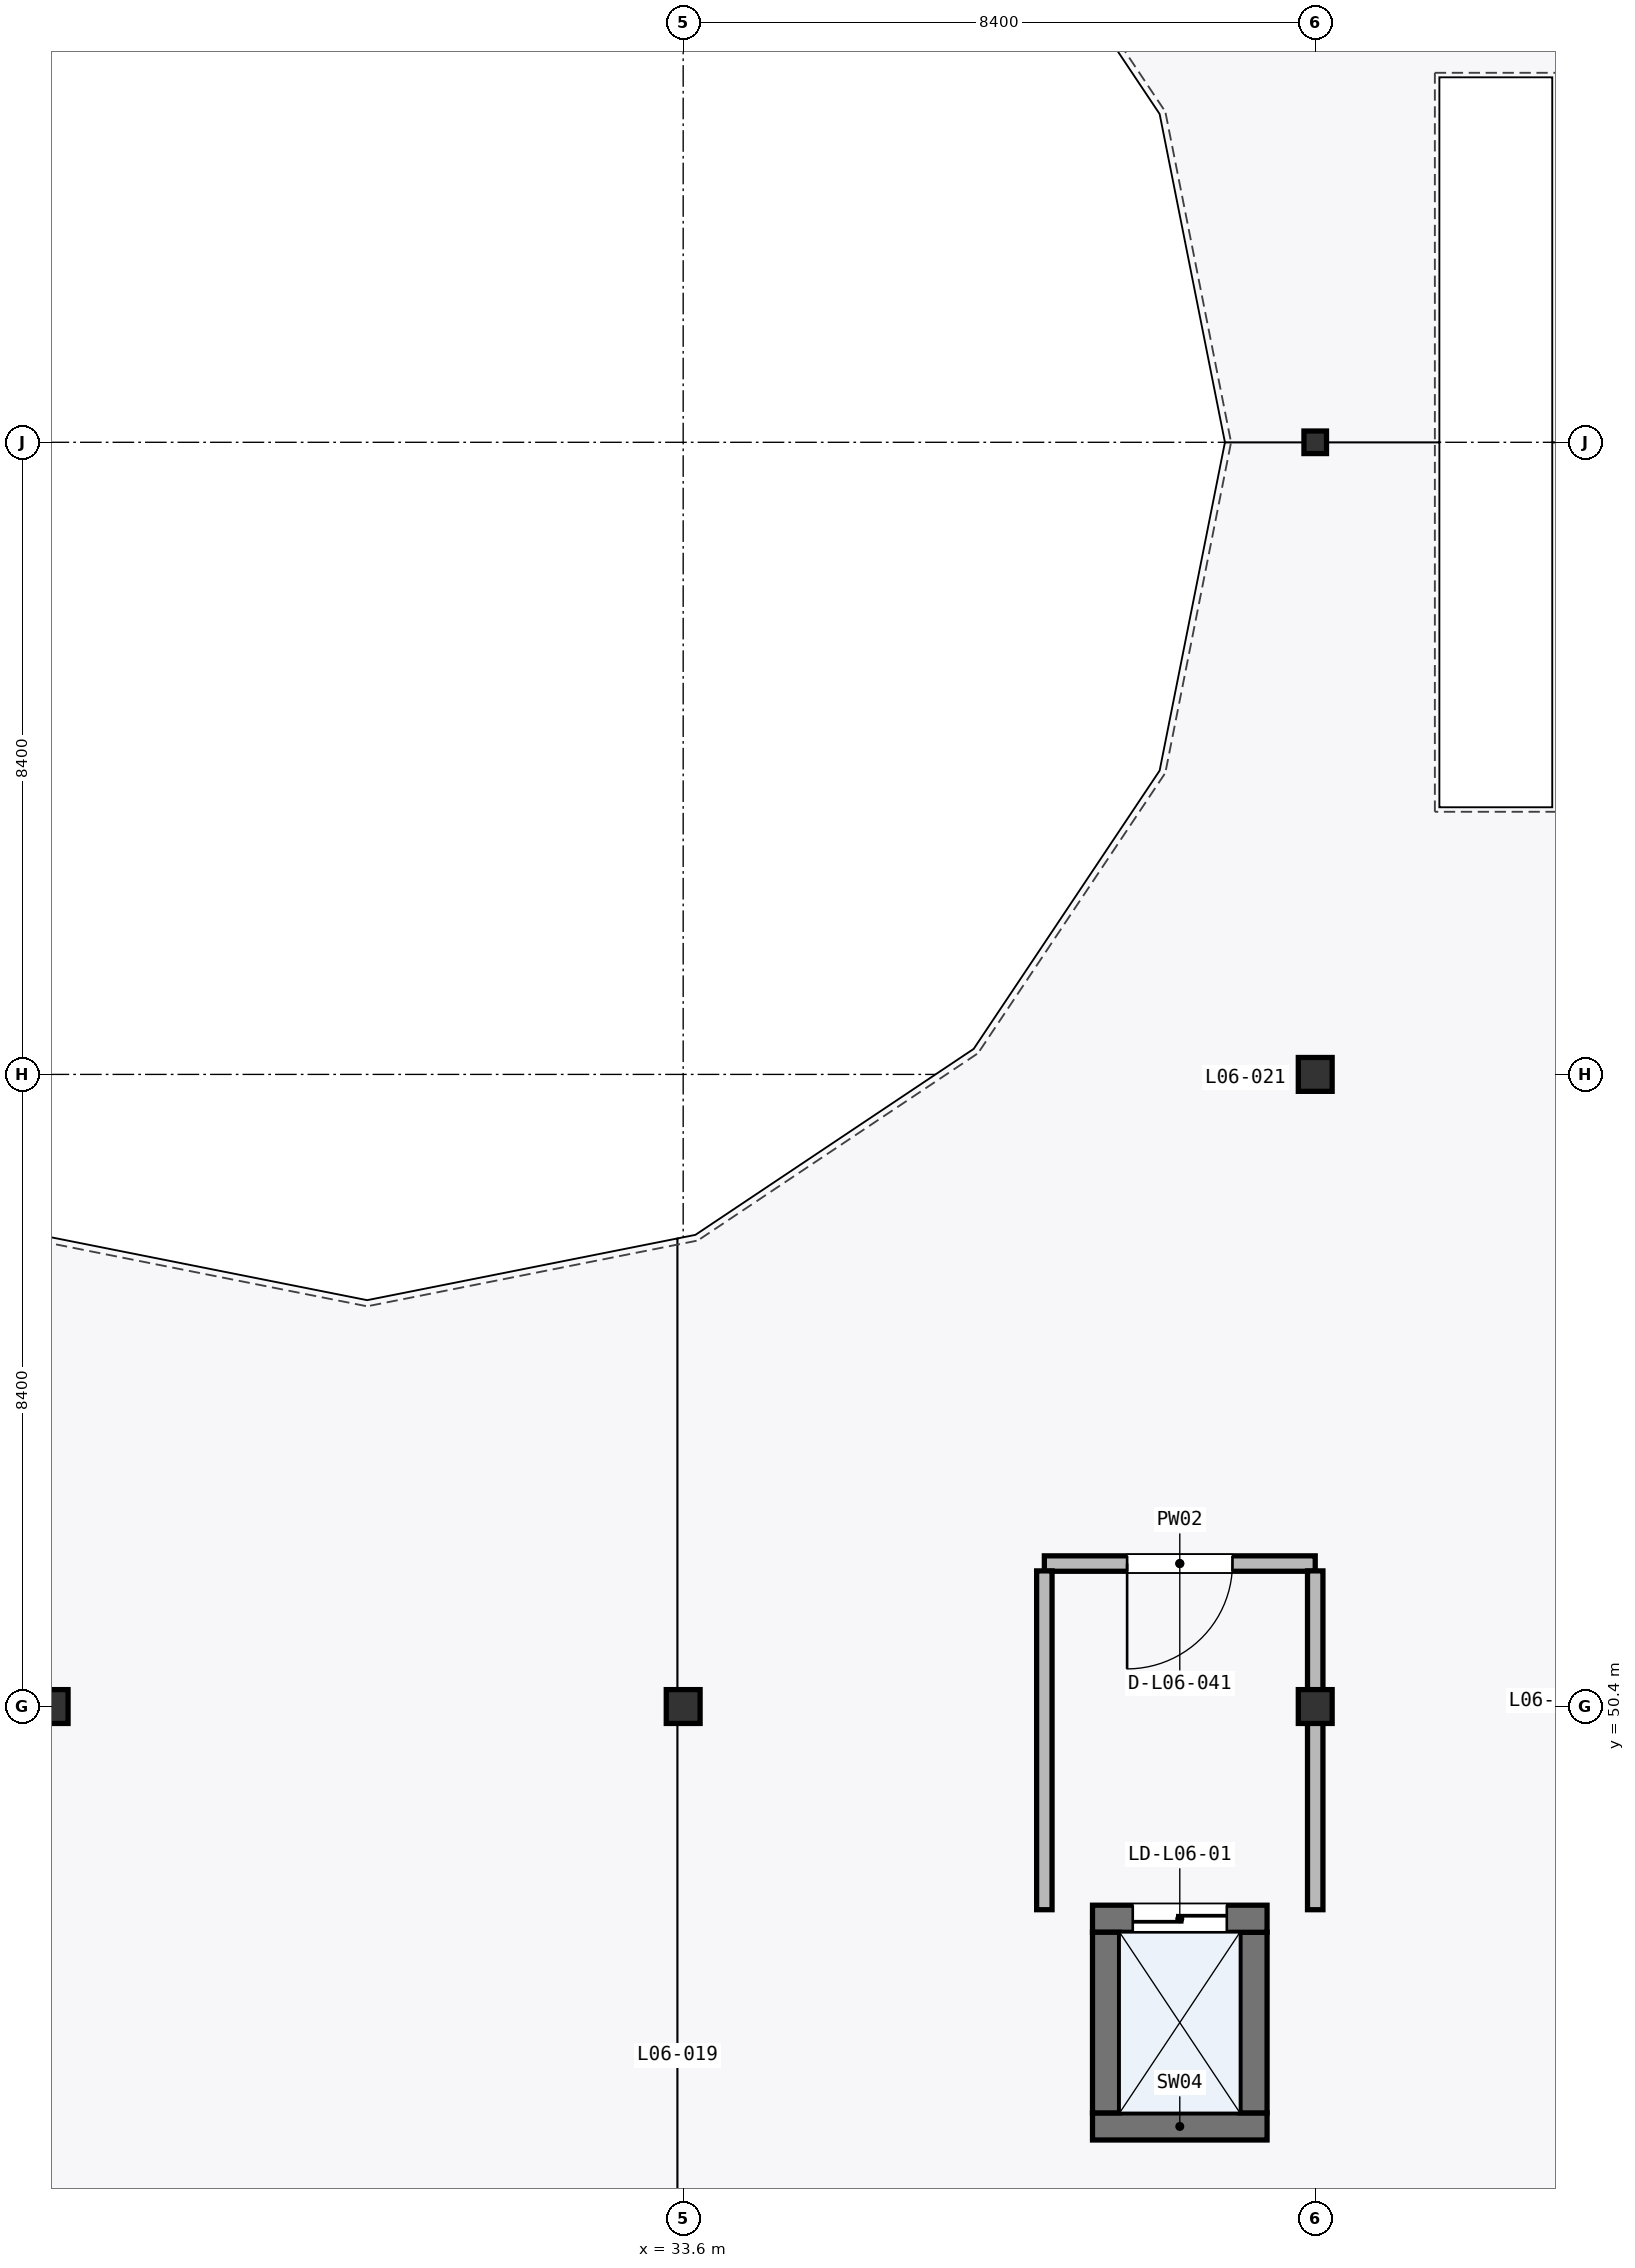
"""IFC4 building model, lengths in metres.
Left out: names, types, materials, properties, quantities, classifications, styles, units other than length and angle.
Written with IfcOpenShell. Run it as: python <this file> out.ifc"""

import sys

from ifc_helpers import new_model, si_unit, direction, frame, frame_2d, origin, origin_2d, place, context, subcontext, project, spatial, rectangle, hollow_rectangle, i_section, extrude, element, fill, save


model = new_model("IFC4")
c1 = context("Model", 3, precision=1e-05, world=origin(), true_north=direction((0.0, 1.0)))
c2 = subcontext(c1, "Body", "Model", "MODEL_VIEW")
j1 = project(units=[si_unit("LENGTHUNIT", "METRE"), si_unit("PLANEANGLEUNIT", "RADIAN")], contexts=[c1])
p1 = place(None, origin())
s1 = spatial("IfcSite", under=j1, at=p1, CompositionType="ELEMENT")
p2 = place(p1, origin())
s2 = spatial("IfcBuilding", under=s1, at=p2, CompositionType="ELEMENT")
p3 = place(p2, frame((0.0, 0.0, 26.7)))
s3 = spatial("IfcBuildingStorey", under=s2, at=p3, CompositionType="ELEMENT", Elevation=26.7)
for number, where, z_axis, x_axis in (
    (1, (25.2, 50.4, 0.0), (0.0, 0.0, 1.0), (1.0, 0.0, 0.0)),
    (2, (33.6, 50.4, 0.0), (0.0, 0.0, 1.0), (1.0, 0.0, 0.0)),
    (3, (42.0, 50.4, 0.0), (0.0, 0.0, 1.0), (1.0, 0.0, 0.0)),
    (4, (42.0, 58.8, 0.0), (0.0, 0.0, 1.0), (1.0, 0.0, 0.0)),
):
    element("IfcColumn", number, at=place(p3, frame(where, z_axis=z_axis, x_axis=x_axis)), inside=s3, PredefinedType="COLUMN", context=c2, shape_type="SweptSolid", body=[
        extrude(hollow_rectangle(XDim=0.45, YDim=0.45, WallThickness=0.018, at=origin_2d()), origin(), (0.0, 0.0, 1.0), 5.1),
    ])
p4 = place(p3, frame((42.0, 67.2, 0.0), z_axis=(0.0, 0.0, 1.0), x_axis=(1.0, 0.0, 0.0)))
e5 = element("IfcColumn", 5, at=p4, inside=s3, PredefinedType="COLUMN", context=c2, shape_type="SweptSolid", body=[
    extrude(i_section(OverallWidth=0.3, OverallDepth=0.3, WebThickness=0.01, FlangeThickness=0.015, FilletRadius=0.018, at=origin_2d()), origin(), (0.0, 0.0, 1.0), 5.1),
])
p5 = place(p3, frame((39.04, 44.82, 0.0), z_axis=(0.0, 0.0, 1.0), x_axis=(1.0, 0.0, 0.0)))
e6 = element("IfcWall", 6, at=p5, inside=s3, PredefinedType="SHEAR", context=c2, shape_type="SweptSolid", body=[
    extrude(rectangle(XDim=2.32, YDim=0.36, at=frame_2d((1.16, 0.0))), origin(), (0.0, 0.0, 1.0), 4.095),
])
p6 = place(p3, frame((41.18, 45.0, 0.0), z_axis=(0.0, 0.0, 1.0), x_axis=(0.0, 1.0, 0.0)))
e7 = element("IfcWall", 7, at=p6, inside=s3, PredefinedType="SHEAR", context=c2, shape_type="SweptSolid", body=[
    extrude(rectangle(XDim=2.4, YDim=0.36, at=frame_2d((1.2, 0.0))), origin(), (0.0, 0.0, 1.0), 4.095),
])
p7 = place(p3, frame((41.36, 47.58, 0.0), z_axis=(0.0, 0.0, 1.0), x_axis=(-1.0, 0.0, 0.0)))
e8 = element("IfcWall", 8, at=p7, inside=s3, PredefinedType="SHEAR", context=c2, shape_type="SweptSolid", body=[
    extrude(rectangle(XDim=2.32, YDim=0.36, at=frame_2d((1.16, 0.0))), origin(), (0.0, 0.0, 1.0), 4.095),
])
p8 = place(p7, frame((0.535, 0.0, 0.0)))
e9 = element("IfcOpeningElement", 9, at=p8, cuts=e8, PredefinedType="OPENING", context=c2, shape_type="SweptSolid", body=[
    extrude(rectangle(XDim=1.25, YDim=2.2, at=frame_2d((0.625, 1.1))), frame((0.0, 0.19, 0.0), z_axis=(0.0, -1.0, 0.0), x_axis=(1.0, 0.0, 0.0)), (0.0, 0.0, 1.0), 0.38),
])
p9 = place(p3, frame((39.22, 47.4, 0.0), z_axis=(0.0, 0.0, 1.0), x_axis=(0.0, -1.0, 0.0)))
e10 = element("IfcWall", 10, at=p9, inside=s3, PredefinedType="SHEAR", context=c2, shape_type="SweptSolid", body=[
    extrude(rectangle(XDim=2.4, YDim=0.36, at=frame_2d((1.2, 0.0))), origin(), (0.0, 0.0, 1.0), 4.095),
])
p10 = place(p3, frame((42.0, 52.3, 0.0), z_axis=(0.0, 0.0, 1.0), x_axis=(-1.0, 0.0, 0.0)))
e11 = element("IfcWall", 11, at=p10, inside=s3, PredefinedType="PARTITIONING", context=c2, shape_type="SweptSolid", body=[
    extrude(rectangle(XDim=3.6, YDim=0.205, at=frame_2d((1.8, 0.0))), origin(), (0.0, 0.0, 1.0), 4.845),
])
p11 = place(p10, frame((1.1, 0.0, 0.0)))
e12 = element("IfcOpeningElement", 12, at=p11, cuts=e11, PredefinedType="OPENING", context=c2, shape_type="SweptSolid", body=[
    extrude(rectangle(XDim=1.4, YDim=2.15, at=frame_2d((0.7, 1.075))), frame((0.0, 0.113, 0.0), z_axis=(0.0, -1.0, 0.0), x_axis=(1.0, 0.0, 0.0)), (0.0, 0.0, 1.0), 0.225),
])
p12 = place(p3, frame((42.0, 47.7, 0.0), z_axis=(0.0, 0.0, 1.0), x_axis=(0.0, 1.0, 0.0)))
e13 = element("IfcWall", 13, at=p12, inside=s3, PredefinedType="PARTITIONING", context=c2, shape_type="SweptSolid", body=[
    extrude(rectangle(XDim=4.502, YDim=0.205, at=frame_2d((2.251, 0.0))), origin(), (0.0, 0.0, 1.0), 3.937),
])
p13 = place(p3, frame((38.4, 52.202, 0.0), z_axis=(0.0, 0.0, 1.0), x_axis=(0.0, -1.0, 0.0)))
e14 = element("IfcWall", 14, at=p13, inside=s3, PredefinedType="PARTITIONING", context=c2, shape_type="SweptSolid", body=[
    extrude(rectangle(XDim=4.502, YDim=0.205, at=frame_2d((2.251, 0.0))), origin(), (0.0, 0.0, 1.0), 4.845),
])
p14 = place(p8, frame((1.25, 0.0, 0.0), z_axis=(0.0, 0.0, 1.0), x_axis=(-1.0, 0.0, 0.0)))
e15 = element("IfcDoor", 15, at=p14, inside=s3, OperationType="DOUBLE_DOOR_SLIDING", PredefinedType="DOOR", context=c2, shape_type="SweptSolid", body=[
    extrude(rectangle(XDim=1.25, YDim=2.2, at=frame_2d((0.625, 1.1))), frame((0.0, 0.025, 0.0), z_axis=(0.0, -1.0, 0.0), x_axis=(1.0, 0.0, 0.0)), (0.0, 0.0, 1.0), 0.05),
])
fill(e9, e15)
p15 = place(p11, origin())
e16 = element("IfcDoor", 16, at=p15, inside=s3, OperationType="SINGLE_SWING_RIGHT", PredefinedType="DOOR", context=c2, shape_type="SweptSolid", body=[
    extrude(rectangle(XDim=1.4, YDim=2.15, at=frame_2d((0.7, 1.075))), frame((0.0, 0.025, 0.0), z_axis=(0.0, -1.0, 0.0), x_axis=(1.0, 0.0, 0.0)), (0.0, 0.0, 1.0), 0.05),
])
fill(e12, e16)
save(model, sys.argv[1])
